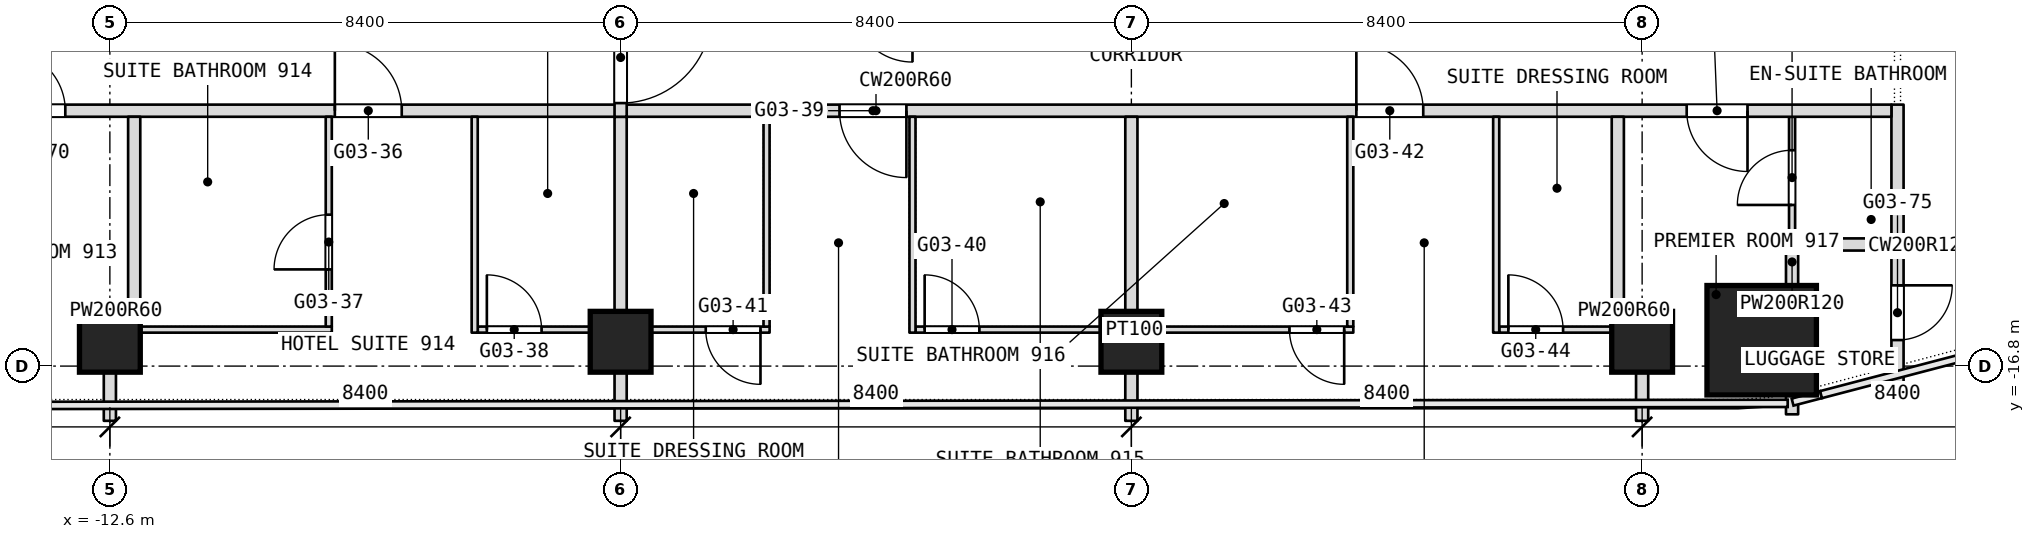
"""IFC4 building model, lengths in metres.
Left out: names, types, materials, properties, quantities, classifications, styles, units other than length and angle.
Written with IfcOpenShell. Run it as: python <this file> out.ifc"""

import sys

from ifc_helpers import new_model, si_unit, direction, frame, frame_2d, origin, origin_2d, place, context, subcontext, project, spatial, rectangle, extrude, element, fill, save


model = new_model("IFC4")
c1 = context("Model", 3, precision=1e-05, world=origin(), true_north=direction((0.0, 1.0)))
c2 = subcontext(c1, "Body", "Model", "MODEL_VIEW")
j1 = project(units=[si_unit("LENGTHUNIT", "METRE"), si_unit("PLANEANGLEUNIT", "RADIAN")], contexts=[c1])
p1 = place(None, origin())
s1 = spatial("IfcSite", under=j1, at=p1, CompositionType="ELEMENT")
p2 = place(p1, origin())
s2 = spatial("IfcBuilding", under=s1, at=p2, CompositionType="ELEMENT")
p3 = place(p2, frame((0.0, 0.0, 47.3)))
s3 = spatial("IfcBuildingStorey", under=s2, at=p3, CompositionType="ELEMENT", Elevation=47.3)
p4 = place(p3, frame((14.566, -16.375, 0.0), z_axis=(0.0, 0.0, 1.0), x_axis=(1.0, 0.0, 0.0)))
e1 = element("IfcColumn", 1, at=p4, inside=s3, PredefinedType="COLUMN", context=c2, shape_type="SweptSolid", body=[
    extrude(rectangle(XDim=1.8, YDim=1.8, at=origin_2d()), origin(), (0.0, 0.0, 1.0), 3.6),
])
for number, where, z_axis, x_axis in (
    (2, (12.6, -16.4, 0.0), (0.0, 0.0, 1.0), (1.0, 0.0, 0.0)),
    (3, (4.2, -16.4, 0.0), (0.0, 0.0, 1.0), (1.0, 0.0, 0.0)),
    (4, (-4.2, -16.4, 0.0), (0.0, 0.0, 1.0), (1.0, 0.0, 0.0)),
    (5, (-12.6, -16.4, 0.0), (0.0, 0.0, 1.0), (1.0, 0.0, 0.0)),
):
    element("IfcColumn", number, at=place(p3, frame(where, z_axis=z_axis, x_axis=x_axis)), inside=s3, PredefinedType="COLUMN", context=c2, shape_type="SweptSolid", body=[
        extrude(rectangle(XDim=1.0, YDim=1.0, at=origin_2d()), origin(), (0.0, 0.0, 1.0), 3.6),
    ])
p5 = place(p3, frame((16.8, -17.143, 0.0), z_axis=(0.0, 0.0, 1.0), x_axis=(0.0, 1.0, 0.0)))
e6 = element("IfcWall", 6, at=p5, inside=s3, PredefinedType="PARTITIONING", context=c2, shape_type="SweptSolid", body=[
    extrude(rectangle(XDim=4.643, YDim=0.2, at=frame_2d((2.322, 0.0))), origin(), (0.0, 0.0, 1.0), 3.34),
])
p6 = place(p5, frame((0.771, 0.0, 0.0)))
e7 = element("IfcOpeningElement", 7, at=p6, cuts=e6, PredefinedType="OPENING", context=c2, shape_type="SweptSolid", body=[
    extrude(rectangle(XDim=0.9, YDim=2.1, at=frame_2d((0.45, 1.05))), frame((0.0, 0.1, 0.0), z_axis=(0.0, -1.0, 0.0), x_axis=(1.0, 0.0, 0.0)), (0.0, 0.0, 1.0), 0.2),
])
p7 = place(p3, frame((-12.5, -16.2, 0.0), z_axis=(0.0, 0.0, 1.0), x_axis=(1.0, 0.0, 0.0)))
e8 = element("IfcWall", 8, at=p7, inside=s3, PredefinedType="PARTITIONING", context=c2, shape_type="SweptSolid", body=[
    extrude(rectangle(XDim=3.55, YDim=0.1, at=frame_2d((1.775, 0.0))), origin(), (0.0, 0.0, 1.0), 2.94),
])
p8 = place(p3, frame((-6.55, -16.2, 0.0), z_axis=(0.0, 0.0, 1.0), x_axis=(1.0, 0.0, 0.0)))
e9 = element("IfcWall", 9, at=p8, inside=s3, PredefinedType="PARTITIONING", context=c2, shape_type="SweptSolid", body=[
    extrude(rectangle(XDim=4.8, YDim=0.1, at=frame_2d((2.4, 0.0))), origin(), (0.0, 0.0, 1.0), 2.94),
])
p9 = place(p8, frame((0.15, 0.0, 0.0)))
e10 = element("IfcOpeningElement", 10, at=p9, cuts=e9, PredefinedType="OPENING", context=c2, shape_type="SweptSolid", body=[
    extrude(rectangle(XDim=0.9, YDim=2.1, at=frame_2d((0.45, 1.05))), frame((0.0, 0.05, 0.0), z_axis=(0.0, -1.0, 0.0), x_axis=(1.0, 0.0, 0.0)), (0.0, 0.0, 1.0), 0.1),
])
p10 = place(p8, frame((3.75, 0.0, 0.0)))
e11 = element("IfcOpeningElement", 11, at=p10, cuts=e9, PredefinedType="OPENING", context=c2, shape_type="SweptSolid", body=[
    extrude(rectangle(XDim=0.9, YDim=2.1, at=frame_2d((0.45, 1.05))), frame((0.0, 0.05, 0.0), z_axis=(0.0, -1.0, 0.0), x_axis=(1.0, 0.0, 0.0)), (0.0, 0.0, 1.0), 0.1),
])
p11 = place(p3, frame((0.65, -16.2, 0.0), z_axis=(0.0, 0.0, 1.0), x_axis=(1.0, 0.0, 0.0)))
e12 = element("IfcWall", 12, at=p11, inside=s3, PredefinedType="PARTITIONING", context=c2, shape_type="SweptSolid", body=[
    extrude(rectangle(XDim=7.2, YDim=0.1, at=frame_2d((3.6, 0.0))), origin(), (0.0, 0.0, 1.0), 2.94),
])
p12 = place(p11, frame((0.15, 0.0, 0.0)))
e13 = element("IfcOpeningElement", 13, at=p12, cuts=e12, PredefinedType="OPENING", context=c2, shape_type="SweptSolid", body=[
    extrude(rectangle(XDim=0.9, YDim=2.1, at=frame_2d((0.45, 1.05))), frame((0.0, 0.05, 0.0), z_axis=(0.0, -1.0, 0.0), x_axis=(1.0, 0.0, 0.0)), (0.0, 0.0, 1.0), 0.1),
])
p13 = place(p11, frame((6.15, 0.0, 0.0)))
e14 = element("IfcOpeningElement", 14, at=p13, cuts=e12, PredefinedType="OPENING", context=c2, shape_type="SweptSolid", body=[
    extrude(rectangle(XDim=0.9, YDim=2.1, at=frame_2d((0.45, 1.05))), frame((0.0, 0.05, 0.0), z_axis=(0.0, -1.0, 0.0), x_axis=(1.0, 0.0, 0.0)), (0.0, 0.0, 1.0), 0.1),
])
p14 = place(p3, frame((10.25, -16.2, 0.0), z_axis=(0.0, 0.0, 1.0), x_axis=(1.0, 0.0, 0.0)))
e15 = element("IfcWall", 15, at=p14, inside=s3, PredefinedType="PARTITIONING", context=c2, shape_type="SweptSolid", body=[
    extrude(rectangle(XDim=2.45, YDim=0.1, at=frame_2d((1.225, 0.0))), origin(), (0.0, 0.0, 1.0), 3.34),
])
p15 = place(p14, frame((0.15, 0.0, 0.0)))
e16 = element("IfcOpeningElement", 16, at=p15, cuts=e15, PredefinedType="OPENING", context=c2, shape_type="SweptSolid", body=[
    extrude(rectangle(XDim=0.9, YDim=2.1, at=frame_2d((0.45, 1.05))), frame((0.0, 0.05, 0.0), z_axis=(0.0, -1.0, 0.0), x_axis=(1.0, 0.0, 0.0)), (0.0, 0.0, 1.0), 0.1),
])
for number, where, z_axis, x_axis in (
    (17, (-12.7, -15.9, 0.0), (0.0, 0.0, 1.0), (1.0, 0.0, 0.0)),
    (18, (12.1, -15.9, 0.0), (0.0, 0.0, 1.0), (1.0, 0.0, 0.0)),
):
    element("IfcWall", number, at=place(p3, frame(where, z_axis=z_axis, x_axis=x_axis)), inside=s3, PredefinedType="PARTITIONING", context=c2, shape_type="SweptSolid", body=[
        extrude(rectangle(XDim=0.4, YDim=0.2, at=frame_2d((0.2, 0.0))), origin(), (0.0, 0.0, 1.0), 3.34),
    ])
p16 = place(p3, frame((15.066, -17.593, 0.0), z_axis=(0.0, 0.0, 1.0), x_axis=(0.0, 1.0, 0.0)))
e19 = element("IfcWall", 19, at=p16, inside=s3, PredefinedType="PARTITIONING", context=c2, shape_type="SweptSolid", body=[
    extrude(rectangle(XDim=0.318, YDim=0.2, at=frame_2d((0.159, 0.0))), origin(), (0.0, 0.0, 1.0), 3.34),
])
p17 = place(p3, frame((15.066, -15.475, 0.0), z_axis=(0.0, 0.0, 1.0), x_axis=(0.0, 1.0, 0.0)))
e20 = element("IfcWall", 20, at=p17, inside=s3, PredefinedType="PARTITIONING", context=c2, shape_type="SweptSolid", body=[
    extrude(rectangle(XDim=0.775, YDim=0.2, at=frame_2d((0.388, 0.0))), origin(), (0.0, 0.0, 1.0), 3.34),
])
p18 = place(p3, frame((15.066, -14.9, 0.0), z_axis=(0.0, 0.0, 1.0), x_axis=(0.0, 1.0, 0.0)))
e21 = element("IfcWall", 21, at=p18, inside=s3, PredefinedType="PARTITIONING", context=c2, shape_type="SweptSolid", body=[
    extrude(rectangle(XDim=2.2, YDim=0.1, at=frame_2d((1.1, 0.0))), origin(), (0.0, 0.0, 1.0), 3.34),
])
p19 = place(p18, frame((0.75, 0.0, 0.0)))
e22 = element("IfcOpeningElement", 22, at=p19, cuts=e21, PredefinedType="OPENING", context=c2, shape_type="SweptSolid", body=[
    extrude(rectangle(XDim=0.9, YDim=2.1, at=frame_2d((0.45, 1.05))), frame((0.0, 0.05, 0.0), z_axis=(0.0, -1.0, 0.0), x_axis=(1.0, 0.0, 0.0)), (0.0, 0.0, 1.0), 0.1),
])
p20 = place(p3, frame((15.116, -14.8, 0.0), z_axis=(0.0, 0.0, 1.0), x_axis=(1.0, 0.0, 0.0)))
e23 = element("IfcWall", 23, at=p20, inside=s3, PredefinedType="PARTITIONING", context=c2, shape_type="SweptSolid", body=[
    extrude(rectangle(XDim=1.584, YDim=0.2, at=frame_2d((0.792, 0.0))), origin(), (0.0, 0.0, 1.0), 3.34),
])
p21 = place(p3, frame((12.6, -17.7, 0.0), z_axis=(0.0, 0.0, 1.0), x_axis=(0.0, 1.0, 0.0)))
e24 = element("IfcWall", 24, at=p21, inside=s3, PredefinedType="PARTITIONING", context=c2, shape_type="SweptSolid", body=[
    extrude(rectangle(XDim=1.9, YDim=0.2, at=frame_2d((0.95, 0.0))), origin(), (0.0, 0.0, 1.0), 3.34),
])
p22 = place(p3, frame((-16.7, -12.6, 0.0), z_axis=(0.0, 0.0, 1.0), x_axis=(1.0, 0.0, 0.0)))
e25 = element("IfcWall", 25, at=p22, inside=s3, PredefinedType="PARTITIONING", context=c2, shape_type="SweptSolid", body=[
    extrude(rectangle(XDim=33.4, YDim=0.2, at=frame_2d((16.7, 0.0))), origin(), (0.0, 0.0, 1.0), 3.34),
])
p23 = place(p22, frame((7.8, 0.0, 0.0)))
e26 = element("IfcOpeningElement", 26, at=p23, cuts=e25, PredefinedType="OPENING", context=c2, shape_type="SweptSolid", body=[
    extrude(rectangle(XDim=1.1, YDim=2.1, at=frame_2d((0.55, 1.05))), frame((0.0, 0.1, 0.0), z_axis=(0.0, -1.0, 0.0), x_axis=(1.0, 0.0, 0.0)), (0.0, 0.0, 1.0), 0.2),
])
p24 = place(p22, frame((16.1, 0.0, 0.0)))
e27 = element("IfcOpeningElement", 27, at=p24, cuts=e25, PredefinedType="OPENING", context=c2, shape_type="SweptSolid", body=[
    extrude(rectangle(XDim=1.1, YDim=2.1, at=frame_2d((0.55, 1.05))), frame((0.0, 0.1, 0.0), z_axis=(0.0, -1.0, 0.0), x_axis=(1.0, 0.0, 0.0)), (0.0, 0.0, 1.0), 0.2),
])
p25 = place(p22, frame((24.6, 0.0, 0.0)))
e28 = element("IfcOpeningElement", 28, at=p25, cuts=e25, PredefinedType="OPENING", context=c2, shape_type="SweptSolid", body=[
    extrude(rectangle(XDim=1.1, YDim=2.1, at=frame_2d((0.55, 1.05))), frame((0.0, 0.1, 0.0), z_axis=(0.0, -1.0, 0.0), x_axis=(1.0, 0.0, 0.0)), (0.0, 0.0, 1.0), 0.2),
])
p26 = place(p22, frame((2.367, 0.0, 0.0)))
e29 = element("IfcOpeningElement", 29, at=p26, cuts=e25, PredefinedType="OPENING", context=c2, shape_type="SweptSolid", body=[
    extrude(rectangle(XDim=1.0, YDim=2.1, at=frame_2d((0.5, 1.05))), frame((0.0, 0.1, 0.0), z_axis=(0.0, -1.0, 0.0), x_axis=(1.0, 0.0, 0.0)), (0.0, 0.0, 1.0), 0.2),
])
p27 = place(p22, frame((30.033, 0.0, 0.0)))
e30 = element("IfcOpeningElement", 30, at=p27, cuts=e25, PredefinedType="OPENING", context=c2, shape_type="SweptSolid", body=[
    extrude(rectangle(XDim=1.0, YDim=2.1, at=frame_2d((0.5, 1.05))), frame((0.0, 0.1, 0.0), z_axis=(0.0, -1.0, 0.0), x_axis=(1.0, 0.0, 0.0)), (0.0, 0.0, 1.0), 0.2),
])
p28 = place(p3, frame((12.2, -15.8, 0.0), z_axis=(0.0, 0.0, 1.0), x_axis=(0.0, 1.0, 0.0)))
e31 = element("IfcWall", 31, at=p28, inside=s3, PredefinedType="PARTITIONING", context=c2, shape_type="SweptSolid", body=[
    extrude(rectangle(XDim=3.1, YDim=0.2, at=frame_2d((1.55, 0.0))), origin(), (0.0, 0.0, 1.0), 3.34),
])
p29 = place(p3, frame((10.2, -16.25, 0.0), z_axis=(0.0, 0.0, 1.0), x_axis=(0.0, 1.0, 0.0)))
e32 = element("IfcWall", 32, at=p29, inside=s3, PredefinedType="PARTITIONING", context=c2, shape_type="SweptSolid", body=[
    extrude(rectangle(XDim=3.55, YDim=0.1, at=frame_2d((1.775, 0.0))), origin(), (0.0, 0.0, 1.0), 3.34),
])
p30 = place(p3, frame((7.8, -16.15, 0.0), z_axis=(0.0, 0.0, 1.0), x_axis=(0.0, 1.0, 0.0)))
e33 = element("IfcWall", 33, at=p30, inside=s3, PredefinedType="PARTITIONING", context=c2, shape_type="SweptSolid", body=[
    extrude(rectangle(XDim=3.45, YDim=0.1, at=frame_2d((1.725, 0.0))), origin(), (0.0, 0.0, 1.0), 3.34),
])
p31 = place(p3, frame((4.2, -17.7, 0.0), z_axis=(0.0, 0.0, 1.0), x_axis=(0.0, 1.0, 0.0)))
e34 = element("IfcWall", 34, at=p31, inside=s3, PredefinedType="PARTITIONING", context=c2, shape_type="SweptSolid", body=[
    extrude(rectangle(XDim=5.0, YDim=0.2, at=frame_2d((2.5, 0.0))), origin(), (0.0, 0.0, 1.0), 3.34),
])
p32 = place(p3, frame((0.6, -16.25, 0.0), z_axis=(0.0, 0.0, 1.0), x_axis=(0.0, 1.0, 0.0)))
e35 = element("IfcWall", 35, at=p32, inside=s3, PredefinedType="PARTITIONING", context=c2, shape_type="SweptSolid", body=[
    extrude(rectangle(XDim=3.55, YDim=0.1, at=frame_2d((1.775, 0.0))), origin(), (0.0, 0.0, 1.0), 3.34),
])
p33 = place(p3, frame((-1.8, -16.15, 0.0), z_axis=(0.0, 0.0, 1.0), x_axis=(0.0, 1.0, 0.0)))
e36 = element("IfcWall", 36, at=p33, inside=s3, PredefinedType="PARTITIONING", context=c2, shape_type="SweptSolid", body=[
    extrude(rectangle(XDim=3.45, YDim=0.1, at=frame_2d((1.725, 0.0))), origin(), (0.0, 0.0, 1.0), 3.34),
])
p34 = place(p3, frame((-4.2, -17.7, 0.0), z_axis=(0.0, 0.0, 1.0), x_axis=(0.0, 1.0, 0.0)))
e37 = element("IfcWall", 37, at=p34, inside=s3, PredefinedType="PARTITIONING", context=c2, shape_type="SweptSolid", body=[
    extrude(rectangle(XDim=5.0, YDim=0.2, at=frame_2d((2.5, 0.0))), origin(), (0.0, 0.0, 1.0), 3.34),
])
p35 = place(p3, frame((-4.2, -12.7, 0.0), z_axis=(0.0, 0.0, 1.0), x_axis=(0.0, 1.0, 0.0)))
e38 = element("IfcWall", 38, at=p35, inside=s3, PredefinedType="PARTITIONING", context=c2, shape_type="SweptSolid", body=[
    extrude(rectangle(XDim=12.7, YDim=0.2, at=frame_2d((6.35, 0.0))), origin(), (0.0, 0.0, 1.0), 3.34),
])
p36 = place(p35, frame((11.05, 0.0, 0.0)))
e39 = element("IfcOpeningElement", 39, at=p36, cuts=e38, PredefinedType="OPENING", context=c2, shape_type="SweptSolid", body=[
    extrude(rectangle(XDim=1.5, YDim=2.1, at=frame_2d((0.75, 1.05))), frame((0.0, 0.1, 0.0), z_axis=(0.0, -1.0, 0.0), x_axis=(1.0, 0.0, 0.0)), (0.0, 0.0, 1.0), 0.2),
])
p37 = place(p35, frame((0.225, 0.0, 0.0)))
e40 = element("IfcOpeningElement", 40, at=p37, cuts=e38, PredefinedType="OPENING", context=c2, shape_type="SweptSolid", body=[
    extrude(rectangle(XDim=1.5, YDim=2.1, at=frame_2d((0.75, 1.05))), frame((0.0, 0.1, 0.0), z_axis=(0.0, -1.0, 0.0), x_axis=(1.0, 0.0, 0.0)), (0.0, 0.0, 1.0), 0.2),
])
p38 = place(p3, frame((-6.6, -16.25, 0.0), z_axis=(0.0, 0.0, 1.0), x_axis=(0.0, 1.0, 0.0)))
e41 = element("IfcWall", 41, at=p38, inside=s3, PredefinedType="PARTITIONING", context=c2, shape_type="SweptSolid", body=[
    extrude(rectangle(XDim=3.55, YDim=0.1, at=frame_2d((1.775, 0.0))), origin(), (0.0, 0.0, 1.0), 3.34),
])
p39 = place(p3, frame((-9.0, -16.15, 0.0), z_axis=(0.0, 0.0, 1.0), x_axis=(0.0, 1.0, 0.0)))
e42 = element("IfcWall", 42, at=p39, inside=s3, PredefinedType="PARTITIONING", context=c2, shape_type="SweptSolid", body=[
    extrude(rectangle(XDim=3.45, YDim=0.1, at=frame_2d((1.725, 0.0))), origin(), (0.0, 0.0, 1.0), 3.34),
])
p40 = place(p39, frame((0.94, 0.0, 0.0)))
e43 = element("IfcOpeningElement", 43, at=p40, cuts=e42, PredefinedType="OPENING", context=c2, shape_type="SweptSolid", body=[
    extrude(rectangle(XDim=0.9, YDim=2.1, at=frame_2d((0.45, 1.05))), frame((0.0, 0.05, 0.0), z_axis=(0.0, -1.0, 0.0), x_axis=(1.0, 0.0, 0.0)), (0.0, 0.0, 1.0), 0.1),
])
p41 = place(p3, frame((-12.2, -16.0, 0.0), z_axis=(0.0, 0.0, 1.0), x_axis=(0.0, 1.0, 0.0)))
e44 = element("IfcWall", 44, at=p41, inside=s3, PredefinedType="PARTITIONING", context=c2, shape_type="SweptSolid", body=[
    extrude(rectangle(XDim=3.3, YDim=0.2, at=frame_2d((1.65, 0.0))), origin(), (0.0, 0.0, 1.0), 3.34),
])
p42 = place(p3, frame((-12.6, -17.7, 0.0), z_axis=(0.0, 0.0, 1.0), x_axis=(0.0, 1.0, 0.0)))
e45 = element("IfcWall", 45, at=p42, inside=s3, PredefinedType="PARTITIONING", context=c2, shape_type="SweptSolid", body=[
    extrude(rectangle(XDim=1.7, YDim=0.2, at=frame_2d((0.85, 0.0))), origin(), (0.0, 0.0, 1.0), 3.34),
])
p43 = place(p6, origin())
e46 = element("IfcDoor", 46, at=p43, inside=s3, OperationType="SINGLE_SWING_RIGHT", PredefinedType="DOOR", context=c2, shape_type="SweptSolid", body=[
    extrude(rectangle(XDim=0.9, YDim=2.1, at=frame_2d((0.45, 1.05))), frame((0.0, 0.025, 0.0), z_axis=(0.0, -1.0, 0.0), x_axis=(1.0, 0.0, 0.0)), (0.0, 0.0, 1.0), 0.05),
])
fill(e7, e46)
p44 = place(p9, origin())
e47 = element("IfcDoor", 47, at=p44, inside=s3, OperationType="SINGLE_SWING_LEFT", PredefinedType="DOOR", context=c2, shape_type="SweptSolid", body=[
    extrude(rectangle(XDim=0.9, YDim=2.1, at=frame_2d((0.45, 1.05))), frame((0.0, 0.025, 0.0), z_axis=(0.0, -1.0, 0.0), x_axis=(1.0, 0.0, 0.0)), (0.0, 0.0, 1.0), 0.05),
])
fill(e10, e47)
p45 = place(p10, origin())
e48 = element("IfcDoor", 48, at=p45, inside=s3, OperationType="SINGLE_SWING_RIGHT", PredefinedType="DOOR", context=c2, shape_type="SweptSolid", body=[
    extrude(rectangle(XDim=0.9, YDim=2.1, at=frame_2d((0.45, 1.05))), frame((0.0, 0.025, 0.0), z_axis=(0.0, -1.0, 0.0), x_axis=(1.0, 0.0, 0.0)), (0.0, 0.0, 1.0), 0.05),
])
fill(e11, e48)
p46 = place(p12, origin())
e49 = element("IfcDoor", 49, at=p46, inside=s3, OperationType="SINGLE_SWING_LEFT", PredefinedType="DOOR", context=c2, shape_type="SweptSolid", body=[
    extrude(rectangle(XDim=0.9, YDim=2.1, at=frame_2d((0.45, 1.05))), frame((0.0, 0.025, 0.0), z_axis=(0.0, -1.0, 0.0), x_axis=(1.0, 0.0, 0.0)), (0.0, 0.0, 1.0), 0.05),
])
fill(e13, e49)
p47 = place(p13, origin())
e50 = element("IfcDoor", 50, at=p47, inside=s3, OperationType="SINGLE_SWING_RIGHT", PredefinedType="DOOR", context=c2, shape_type="SweptSolid", body=[
    extrude(rectangle(XDim=0.9, YDim=2.1, at=frame_2d((0.45, 1.05))), frame((0.0, 0.025, 0.0), z_axis=(0.0, -1.0, 0.0), x_axis=(1.0, 0.0, 0.0)), (0.0, 0.0, 1.0), 0.05),
])
fill(e14, e50)
p48 = place(p15, origin())
e51 = element("IfcDoor", 51, at=p48, inside=s3, OperationType="SINGLE_SWING_LEFT", PredefinedType="DOOR", context=c2, shape_type="SweptSolid", body=[
    extrude(rectangle(XDim=0.9, YDim=2.1, at=frame_2d((0.45, 1.05))), frame((0.0, 0.025, 0.0), z_axis=(0.0, -1.0, 0.0), x_axis=(1.0, 0.0, 0.0)), (0.0, 0.0, 1.0), 0.05),
])
fill(e16, e51)
p49 = place(p19, origin())
e52 = element("IfcDoor", 52, at=p49, inside=s3, OperationType="SINGLE_SWING_RIGHT", PredefinedType="DOOR", context=c2, shape_type="SweptSolid", body=[
    extrude(rectangle(XDim=0.9, YDim=2.1, at=frame_2d((0.45, 1.05))), frame((0.0, 0.025, 0.0), z_axis=(0.0, -1.0, 0.0), x_axis=(1.0, 0.0, 0.0)), (0.0, 0.0, 1.0), 0.05),
])
fill(e22, e52)
p50 = place(p23, origin())
e53 = element("IfcDoor", 53, at=p50, inside=s3, OperationType="SINGLE_SWING_RIGHT", PredefinedType="DOOR", context=c2, shape_type="SweptSolid", body=[
    extrude(rectangle(XDim=1.1, YDim=2.1, at=frame_2d((0.55, 1.05))), frame((0.0, 0.025, 0.0), z_axis=(0.0, -1.0, 0.0), x_axis=(1.0, 0.0, 0.0)), (0.0, 0.0, 1.0), 0.05),
])
fill(e26, e53)
p51 = place(p24, origin())
e54 = element("IfcDoor", 54, at=p51, inside=s3, OperationType="SINGLE_SWING_LEFT", PredefinedType="DOOR", context=c2, shape_type="SweptSolid", body=[
    extrude(rectangle(XDim=1.1, YDim=2.1, at=frame_2d((0.55, 1.05))), frame((0.0, 0.025, 0.0), z_axis=(0.0, -1.0, 0.0), x_axis=(1.0, 0.0, 0.0)), (0.0, 0.0, 1.0), 0.05),
])
fill(e27, e54)
p52 = place(p25, origin())
e55 = element("IfcDoor", 55, at=p52, inside=s3, OperationType="SINGLE_SWING_RIGHT", PredefinedType="DOOR", context=c2, shape_type="SweptSolid", body=[
    extrude(rectangle(XDim=1.1, YDim=2.1, at=frame_2d((0.55, 1.05))), frame((0.0, 0.025, 0.0), z_axis=(0.0, -1.0, 0.0), x_axis=(1.0, 0.0, 0.0)), (0.0, 0.0, 1.0), 0.05),
])
fill(e28, e55)
p53 = place(p26, origin())
e56 = element("IfcDoor", 56, at=p53, inside=s3, OperationType="SINGLE_SWING_RIGHT", PredefinedType="DOOR", context=c2, shape_type="SweptSolid", body=[
    extrude(rectangle(XDim=1.0, YDim=2.1, at=frame_2d((0.5, 1.05))), frame((0.0, 0.025, 0.0), z_axis=(0.0, -1.0, 0.0), x_axis=(1.0, 0.0, 0.0)), (0.0, 0.0, 1.0), 0.05),
])
fill(e29, e56)
p54 = place(p27, origin())
e57 = element("IfcDoor", 57, at=p54, inside=s3, OperationType="SINGLE_SWING_LEFT", PredefinedType="DOOR", context=c2, shape_type="SweptSolid", body=[
    extrude(rectangle(XDim=1.0, YDim=2.1, at=frame_2d((0.5, 1.05))), frame((0.0, 0.025, 0.0), z_axis=(0.0, -1.0, 0.0), x_axis=(1.0, 0.0, 0.0)), (0.0, 0.0, 1.0), 0.05),
])
fill(e30, e57)
p55 = place(p40, origin())
e58 = element("IfcDoor", 58, at=p55, inside=s3, OperationType="SINGLE_SWING_LEFT", PredefinedType="DOOR", context=c2, shape_type="SweptSolid", body=[
    extrude(rectangle(XDim=0.9, YDim=2.1, at=frame_2d((0.45, 1.05))), frame((0.0, 0.025, 0.0), z_axis=(0.0, -1.0, 0.0), x_axis=(1.0, 0.0, 0.0)), (0.0, 0.0, 1.0), 0.05),
])
fill(e43, e58)
p56 = place(p37, origin())
e59 = element("IfcDoor", 59, at=p56, inside=s3, OperationType="DOUBLE_DOOR_DOUBLE_SWING", PredefinedType="DOOR", context=c2, shape_type="SweptSolid", body=[
    extrude(rectangle(XDim=1.5, YDim=2.1, at=frame_2d((0.75, 1.05))), frame((0.0, 0.025, 0.0), z_axis=(0.0, -1.0, 0.0), x_axis=(1.0, 0.0, 0.0)), (0.0, 0.0, 1.0), 0.05),
])
fill(e40, e59)
save(model, sys.argv[1])
